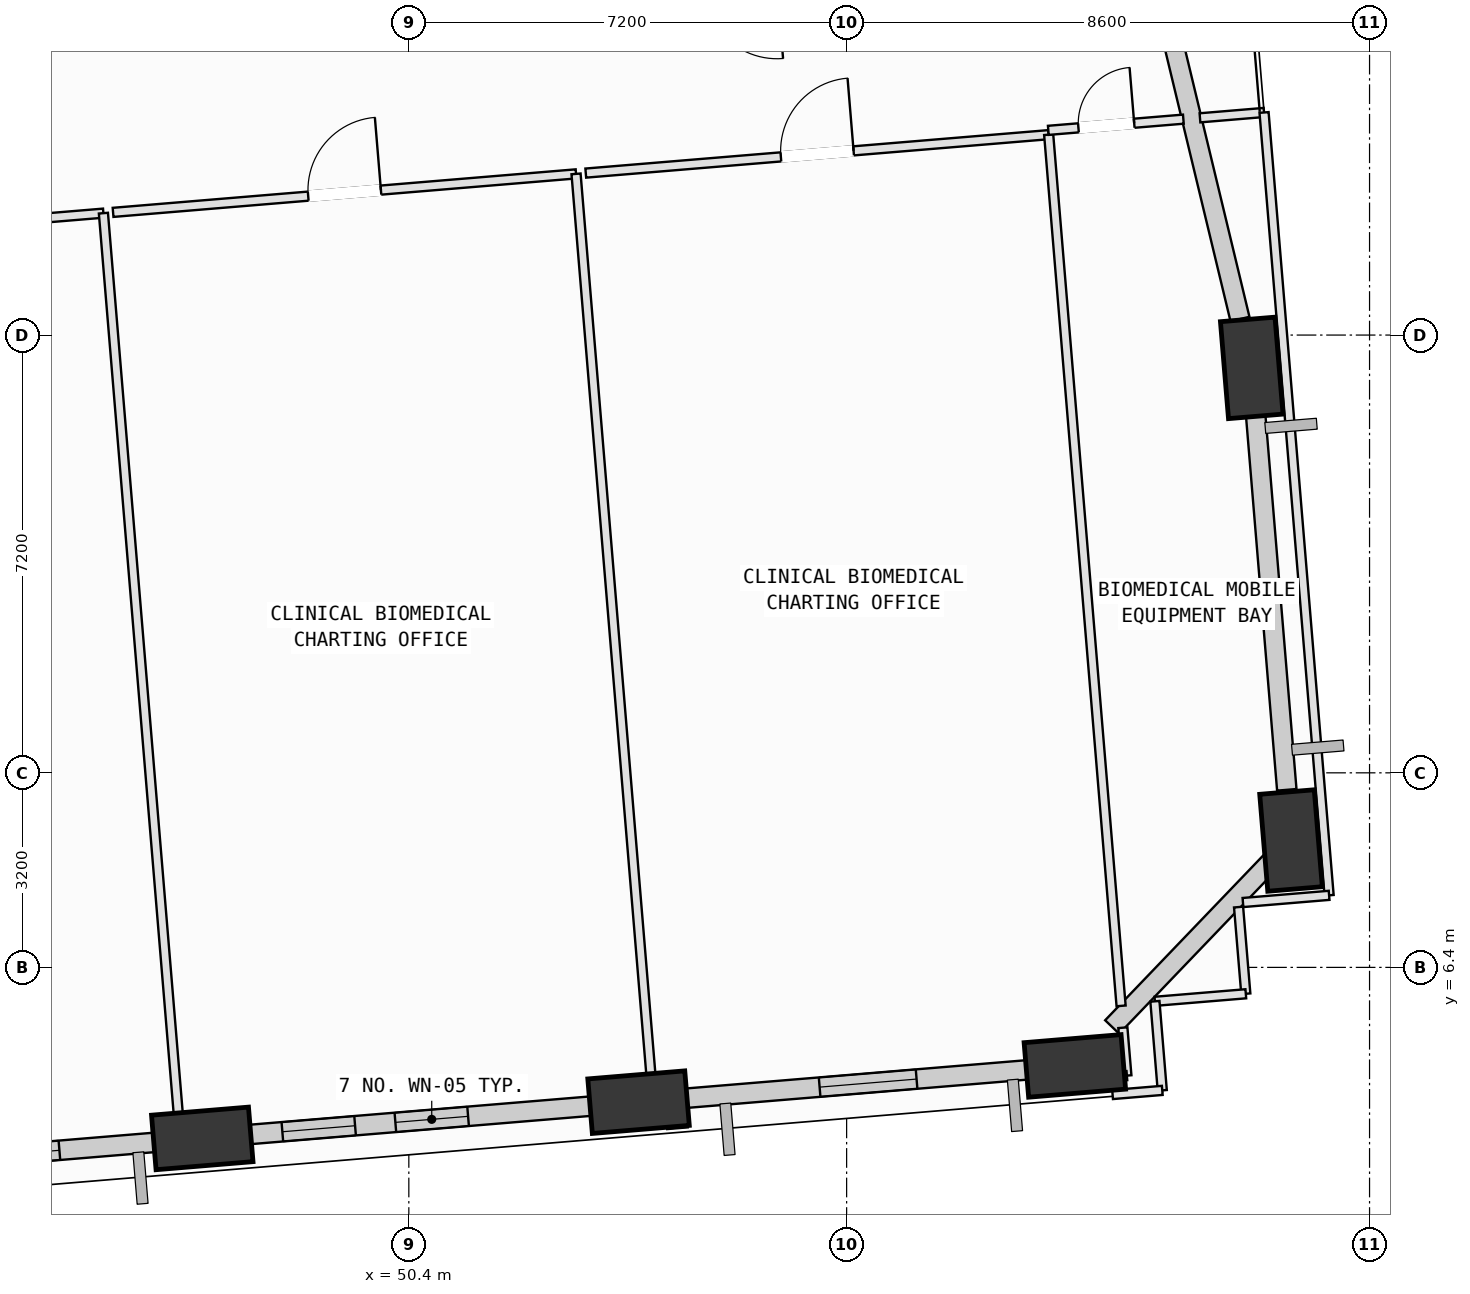
"""IFC4 building model, lengths in metres.
Left out: names, types, materials, properties, quantities, classifications, styles, units other than length and angle.
Written with IfcOpenShell. Run it as: python <this file> out.ifc"""

import sys

from ifc_helpers import new_model, si_unit, direction, frame, frame_2d, origin, origin_2d, place, context, subcontext, project, spatial, rectangle, extrude, element, fill, save


model = new_model("IFC4")
c1 = context("Model", 3, precision=1e-05, world=origin(), true_north=direction((0.0, 1.0)))
c2 = subcontext(c1, "Body", "Model", "MODEL_VIEW")
j1 = project(units=[si_unit("LENGTHUNIT", "METRE"), si_unit("PLANEANGLEUNIT", "RADIAN")], contexts=[c1])
p1 = place(None, origin())
s1 = spatial("IfcSite", under=j1, at=p1, CompositionType="ELEMENT")
p2 = place(p1, origin())
s2 = spatial("IfcBuilding", under=s1, at=p2, CompositionType="ELEMENT")
p3 = place(p2, frame((0.0, 0.0, 43.0)))
s3 = spatial("IfcBuildingStorey", under=s2, at=p3, CompositionType="ELEMENT", Elevation=43.0)
p4 = place(p3, frame((47.003, 3.587, 0.002), z_axis=(0.087007750901, 0.05595959398, 0.99463469431), x_axis=(-0.608351167105, 0.793621744244, 0.008566477999)))
e1 = element("IfcColumn", 1, at=p4, inside=s3, PredefinedType="COLUMN", context=c2, shape_type="SweptSolid", body=[
    extrude(rectangle(XDim=1.6, YDim=0.9, at=origin_2d()), origin(), (0.0, 0.0, 1.0), 4.018),
])
p5 = place(p3, frame((54.178, 4.183, 0.002), z_axis=(0.084177518117, 0.085390450655, 0.992785282113), x_axis=(-0.767415180353, 0.641073593575, 0.00992917841)))
e2 = element("IfcColumn", 2, at=p5, inside=s3, PredefinedType="COLUMN", context=c2, shape_type="SweptSolid", body=[
    extrude(rectangle(XDim=1.6, YDim=0.9, at=origin_2d()), origin(), (0.0, 0.0, 1.0), 4.026),
])
p6 = place(p3, frame((61.353, 4.78, 0.002), z_axis=(0.081226798474, 0.11461264565, 0.990083909912), x_axis=(-0.860485068136, 0.509342839907, 0.011632667372)))
e3 = element("IfcColumn", 3, at=p6, inside=s3, PredefinedType="COLUMN", context=c2, shape_type="SweptSolid", body=[
    extrude(rectangle(XDim=1.6, YDim=0.9, at=origin_2d()), origin(), (0.0, 0.0, 1.0), 4.037),
])
p7 = place(p3, frame((64.908, 8.487, 0.002), z_axis=(0.065883618788, 0.128926384289, 0.989463155559), x_axis=(-0.374965636524, -0.915741149451, 0.144287624654)))
e4 = element("IfcColumn", 4, at=p7, inside=s3, PredefinedType="COLUMN", context=c2, shape_type="SweptSolid", body=[
    extrude(rectangle(XDim=1.6, YDim=0.9, at=origin_2d()), origin(), (0.0, 0.0, 1.0), 4.039),
])
p8 = place(p3, frame((64.262, 16.26, 0.002), z_axis=(0.034096730503, 0.126272971756, 0.991409375371), x_axis=(-0.17761535471, -0.975429466717, 0.130346235969)))
e5 = element("IfcColumn", 5, at=p8, inside=s3, PredefinedType="COLUMN", context=c2, shape_type="SweptSolid", body=[
    extrude(rectangle(XDim=1.6, YDim=0.9, at=origin_2d()), origin(), (0.0, 0.0, 1.0), 4.031),
])
p9 = place(p3, frame((46.588, 3.552, 0.0), z_axis=(0.0, 0.0, 1.0), x_axis=(-0.99656613328, -0.082800615939, 0.0)))
e6 = element("IfcWall", 6, at=p9, inside=s3, PredefinedType="SOLIDWALL", context=c2, shape_type="SweptSolid", body=[
    extrude(rectangle(XDim=5.529, YDim=0.32, at=frame_2d((2.764, 0.0))), origin(), (0.0, 0.0, 1.0), 3.145),
])
p10 = place(p9, frame((1.941, 0.0, 0.75)))
e7 = element("IfcOpeningElement", 7, at=p10, cuts=e6, PredefinedType="OPENING", context=c2, shape_type="SweptSolid", body=[
    extrude(rectangle(XDim=1.8, YDim=2.05, at=frame_2d((0.9, 1.025))), frame((0.0, 0.17, 0.0), z_axis=(0.0, -1.0, 0.0), x_axis=(1.0, 0.0, 0.0)), (0.0, 0.0, 1.0), 0.34),
])
p11 = place(p3, frame((53.775, 4.15, 0.0), z_axis=(0.0, 0.0, 1.0), x_axis=(-0.996563099215, -0.082837125026, 0.0)))
e8 = element("IfcWall", 8, at=p11, inside=s3, PredefinedType="SOLIDWALL", context=c2, shape_type="SweptSolid", body=[
    extrude(rectangle(XDim=6.012, YDim=0.32, at=frame_2d((3.006, 0.0))), origin(), (0.0, 0.0, 1.0), 2.865),
])
p12 = place(p11, frame((2.409, 0.0, 0.75)))
e9 = element("IfcOpeningElement", 9, at=p12, cuts=e8, PredefinedType="OPENING", context=c2, shape_type="SweptSolid", body=[
    extrude(rectangle(XDim=1.2, YDim=1.75, at=frame_2d((0.6, 0.875))), frame((0.0, 0.17, 0.0), z_axis=(0.0, -1.0, 0.0), x_axis=(1.0, 0.0, 0.0)), (0.0, 0.0, 1.0), 0.34),
])
p13 = place(p11, frame((4.274, 0.0, 0.75)))
e10 = element("IfcOpeningElement", 10, at=p13, cuts=e8, PredefinedType="OPENING", context=c2, shape_type="SweptSolid", body=[
    extrude(rectangle(XDim=1.2, YDim=1.75, at=frame_2d((0.6, 0.875))), frame((0.0, 0.17, 0.0), z_axis=(0.0, -1.0, 0.0), x_axis=(1.0, 0.0, 0.0)), (0.0, 0.0, 1.0), 0.34),
])
p14 = place(p3, frame((60.969, 4.748, 0.0), z_axis=(0.0, 0.0, 1.0), x_axis=(-0.996566340034, -0.082798127465, 0.0)))
e11 = element("IfcWall", 11, at=p14, inside=s3, PredefinedType="SOLIDWALL", context=c2, shape_type="SweptSolid", body=[
    extrude(rectangle(XDim=6.045, YDim=0.32, at=frame_2d((3.022, 0.0))), origin(), (0.0, 0.0, 1.0), 2.865),
])
p15 = place(p14, frame((2.227, 0.0, 0.75)))
e12 = element("IfcOpeningElement", 12, at=p15, cuts=e11, PredefinedType="OPENING", context=c2, shape_type="SweptSolid", body=[
    extrude(rectangle(XDim=1.6, YDim=1.95, at=frame_2d((0.8, 0.975))), frame((0.0, 0.17, 0.0), z_axis=(0.0, -1.0, 0.0), x_axis=(1.0, 0.0, 0.0)), (0.0, 0.0, 1.0), 0.34),
])
p16 = place(p3, frame((64.686, 8.254, 0.0), z_axis=(0.0, 0.0, 1.0), x_axis=(-0.692157788421, -0.721746212964, 0.0)))
e13 = element("IfcWall", 13, at=p16, inside=s3, PredefinedType="SOLIDWALL", context=c2, shape_type="SweptSolid", body=[
    extrude(rectangle(XDim=3.927, YDim=0.32, at=frame_2d((1.964, 0.0))), origin(), (0.0, 0.0, 1.0), 3.165),
])
p17 = place(p3, frame((64.292, 15.908, 0.0), z_axis=(0.0, 0.0, 1.0), x_axis=(0.082804011352, -0.996565851163, 0.0)))
e14 = element("IfcWall", 14, at=p17, inside=s3, PredefinedType="SOLIDWALL", context=c2, shape_type="SweptSolid", body=[
    extrude(rectangle(XDim=6.61, YDim=0.32, at=frame_2d((3.305, 0.0))), origin(), (0.0, 0.0, 1.0), 3.165),
])
p18 = place(p3, frame((62.052, 25.438, 0.0), z_axis=(0.0, 0.0, 1.0), x_axis=(0.234137183884, -0.972203568767, 0.0)))
e15 = element("IfcWall", 15, at=p18, inside=s3, PredefinedType="SOLIDWALL", context=c2, shape_type="SweptSolid", body=[
    extrude(rectangle(XDim=8.614, YDim=0.32, at=frame_2d((4.307, 0.0))), origin(), (0.0, 0.0, 1.0), 3.165),
])
p19 = place(p3, frame((38.03, 18.194, 0.0), z_axis=(0.0, 0.0, 1.0), x_axis=(0.996561498978, 0.082856374255, 0.0)))
e16 = element("IfcWall", 16, at=p19, inside=s3, PredefinedType="PARTITIONING", context=c2, shape_type="SweptSolid", body=[
    extrude(rectangle(XDim=7.372, YDim=0.15, at=frame_2d((3.686, 0.0))), origin(), (0.0, 0.0, 1.0), 3.78),
])
p20 = place(p19, frame((3.086, 0.0, 0.0)))
e17 = element("IfcOpeningElement", 17, at=p20, cuts=e16, PredefinedType="OPENING", context=c2, shape_type="SweptSolid", body=[
    extrude(rectangle(XDim=1.2, YDim=2.15, at=frame_2d((0.6, 1.075))), frame((0.0, 0.085, 0.0), z_axis=(0.0, -1.0, 0.0), x_axis=(1.0, 0.0, 0.0)), (0.0, 0.0, 1.0), 0.17),
])
p21 = place(p3, frame((45.377, 18.805, 0.0), z_axis=(0.0, 0.0, 1.0), x_axis=(0.082821840324, -0.996564369605, 0.0)))
e18 = element("IfcWall", 18, at=p21, inside=s3, PredefinedType="PARTITIONING", context=c2, shape_type="SweptSolid", body=[
    extrude(rectangle(XDim=15.178, YDim=0.15, at=frame_2d((7.589, 0.0))), origin(), (0.0, 0.0, 1.0), 3.78),
])
p22 = place(p3, frame((45.536, 18.818, 0.0), z_axis=(0.0, 0.0, 1.0), x_axis=(0.996564025251, 0.082825983694, 0.0)))
e19 = element("IfcWall", 19, at=p22, inside=s3, PredefinedType="PARTITIONING", context=c2, shape_type="SweptSolid", body=[
    extrude(rectangle(XDim=7.64, YDim=0.15, at=frame_2d((3.82, 0.0))), origin(), (0.0, 0.0, 1.0), 3.78),
])
p23 = place(p22, frame((3.22, 0.0, 0.0)))
e20 = element("IfcOpeningElement", 20, at=p23, cuts=e19, PredefinedType="OPENING", context=c2, shape_type="SweptSolid", body=[
    extrude(rectangle(XDim=1.2, YDim=2.15, at=frame_2d((0.6, 1.075))), frame((0.0, 0.085, 0.0), z_axis=(0.0, -1.0, 0.0), x_axis=(1.0, 0.0, 0.0)), (0.0, 0.0, 1.0), 0.17),
])
p24 = place(p3, frame((53.15, 19.451, 0.0), z_axis=(0.0, 0.0, 1.0), x_axis=(0.08281520051, -0.9965649214, 0.0)))
e21 = element("IfcWall", 21, at=p24, inside=s3, PredefinedType="PARTITIONING", context=c2, shape_type="SweptSolid", body=[
    extrude(rectangle(XDim=15.53, YDim=0.15, at=frame_2d((7.765, 0.0))), origin(), (0.0, 0.0, 1.0), 3.78),
])
p25 = place(p3, frame((54.436, 3.974, 0.0), z_axis=(0.0, 0.0, 1.0), x_axis=(-0.996582247746, -0.082606437266, 0.0)))
e22 = element("IfcWall", 22, at=p25, inside=s3, PredefinedType="PARTITIONING", context=c2, shape_type="SweptSolid", body=[
    extrude(rectangle(XDim=0.644, YDim=0.15, at=frame_2d((0.322, 0.0))), origin(), (0.0, 0.0, 1.0), 3.78),
])
p26 = place(p3, frame((47.803, 3.423, 0.0), z_axis=(0.0, 0.0, 1.0), x_axis=(-0.9965217706, -0.083332830991, 0.0)))
e23 = element("IfcWall", 23, at=p26, inside=s3, PredefinedType="PARTITIONING", context=c2, shape_type="SweptSolid", body=[
    extrude(rectangle(XDim=0.984, YDim=0.15, at=frame_2d((0.492, 0.0))), origin(), (0.0, 0.0, 1.0), 3.145),
])
p27 = place(p3, frame((53.31, 19.464, 0.0), z_axis=(0.0, 0.0, 1.0), x_axis=(0.996573693204, 0.082709576308, 0.0)))
e24 = element("IfcWall", 24, at=p27, inside=s3, PredefinedType="PARTITIONING", context=c2, shape_type="SweptSolid", body=[
    extrude(rectangle(XDim=7.639, YDim=0.15, at=frame_2d((3.82, 0.0))), origin(), (0.0, 0.0, 1.0), 3.78),
])
p28 = place(p27, frame((3.219, 0.0, 0.0)))
e25 = element("IfcOpeningElement", 25, at=p28, cuts=e24, PredefinedType="OPENING", context=c2, shape_type="SweptSolid", body=[
    extrude(rectangle(XDim=1.2, YDim=2.15, at=frame_2d((0.6, 1.075))), frame((0.0, 0.085, 0.0), z_axis=(0.0, -1.0, 0.0), x_axis=(1.0, 0.0, 0.0)), (0.0, 0.0, 1.0), 0.17),
])
p29 = place(p3, frame((60.923, 20.096, 0.0), z_axis=(0.0, 0.0, 1.0), x_axis=(0.082827667488, -0.996563885307, 0.0)))
e26 = element("IfcWall", 26, at=p29, inside=s3, PredefinedType="PARTITIONING", context=c2, shape_type="SweptSolid", body=[
    extrude(rectangle(XDim=14.378, YDim=0.15, at=frame_2d((7.189, 0.0))), origin(), (0.0, 0.0, 1.0), 3.78),
])
p30 = place(p3, frame((62.143, 5.408, 0.0), z_axis=(0.0, 0.0, 1.0), x_axis=(0.083377708252, -0.99651801678, 0.0)))
e27 = element("IfcWall", 27, at=p30, inside=s3, PredefinedType="PARTITIONING", context=c2, shape_type="SweptSolid", body=[
    extrude(rectangle(XDim=0.791, YDim=0.15, at=frame_2d((0.395, 0.0))), origin(), (0.0, 0.0, 1.0), 3.78),
])
p31 = place(p3, frame((62.209, 4.62, 0.0), z_axis=(0.0, 0.0, 1.0), x_axis=(-0.996590962636, -0.08250123146, 0.0)))
e28 = element("IfcWall", 28, at=p31, inside=s3, PredefinedType="PARTITIONING", context=c2, shape_type="SweptSolid", body=[
    extrude(rectangle(XDim=1.225, YDim=0.15, at=frame_2d((0.613, 0.0))), origin(), (0.0, 0.0, 1.0), 3.78),
])
p32 = place(p3, frame((49.107, 21.934, 0.0), z_axis=(0.0, 0.0, 1.0), x_axis=(-0.996568963574, -0.082766544215, 0.0)))
e29 = element("IfcWall", 29, at=p32, inside=s3, PredefinedType="PARTITIONING", context=c2, shape_type="SweptSolid", body=[
    extrude(rectangle(XDim=14.705, YDim=0.15, at=frame_2d((7.352, 0.0))), origin(), (0.0, 0.0, 1.0), 3.78),
])
p33 = place(p32, frame((6.752, 0.0, 0.0)))
e30 = element("IfcOpeningElement", 30, at=p33, cuts=e29, PredefinedType="OPENING", context=c2, shape_type="SweptSolid", body=[
    extrude(rectangle(XDim=1.2, YDim=2.15, at=frame_2d((0.6, 1.075))), frame((0.0, 0.085, 0.0), z_axis=(0.0, -1.0, 0.0), x_axis=(1.0, 0.0, 0.0)), (0.0, 0.0, 1.0), 0.17),
])
p34 = place(p3, frame((64.046, 7.392, 0.0), z_axis=(0.0, 0.0, 1.0), x_axis=(0.083257268656, -0.996528086516, 0.0)))
e31 = element("IfcWall", 31, at=p34, inside=s3, PredefinedType="PARTITIONING", context=c2, shape_type="SweptSolid", body=[
    extrude(rectangle(XDim=1.431, YDim=0.15, at=frame_2d((0.715, 0.0))), origin(), (0.0, 0.0, 1.0), 3.78),
])
p35 = place(p3, frame((64.165, 5.966, 0.0), z_axis=(0.0, 0.0, 1.0), x_axis=(-0.99657711121, -0.082668382184, 0.0)))
e32 = element("IfcWall", 32, at=p35, inside=s3, PredefinedType="PARTITIONING", context=c2, shape_type="SweptSolid", body=[
    extrude(rectangle(XDim=1.5, YDim=0.15, at=frame_2d((0.75, 0.0))), origin(), (0.0, 0.0, 1.0), 3.78),
])
p36 = place(p3, frame((62.67, 5.842, 0.0), z_axis=(0.0, 0.0, 1.0), x_axis=(0.082372007879, -0.996601651774, 0.0)))
e33 = element("IfcWall", 33, at=p36, inside=s3, PredefinedType="PARTITIONING", context=c2, shape_type="SweptSolid", body=[
    extrude(rectangle(XDim=1.47, YDim=0.15, at=frame_2d((0.735, 0.0))), origin(), (0.0, 0.0, 1.0), 3.78),
])
p37 = place(p3, frame((62.791, 4.377, 0.0), z_axis=(0.0, 0.0, 1.0), x_axis=(-0.99656626832, -0.082798990614, 0.0)))
e34 = element("IfcWall", 34, at=p37, inside=s3, PredefinedType="PARTITIONING", context=c2, shape_type="SweptSolid", body=[
    extrude(rectangle(XDim=0.82, YDim=0.15, at=frame_2d((0.41, 0.0))), origin(), (0.0, 0.0, 1.0), 3.78),
])
p38 = place(p3, frame((60.917, 20.167, 0.0), z_axis=(0.0, 0.0, 1.0), x_axis=(0.996582679805, 0.082601224643, 0.0)))
e35 = element("IfcWall", 35, at=p38, inside=s3, PredefinedType="PARTITIONING", context=c2, shape_type="SweptSolid", body=[
    extrude(rectangle(XDim=2.229, YDim=0.15, at=frame_2d((1.114, 0.0))), origin(), (0.0, 0.0, 1.0), 3.78),
])
p39 = place(p38, frame((0.497, 0.0, 0.0)))
e36 = element("IfcOpeningElement", 36, at=p39, cuts=e35, PredefinedType="OPENING", context=c2, shape_type="SweptSolid", body=[
    extrude(rectangle(XDim=0.92, YDim=2.1, at=frame_2d((0.46, 1.05))), frame((0.0, 0.085, 0.0), z_axis=(0.0, -1.0, 0.0), x_axis=(1.0, 0.0, 0.0)), (0.0, 0.0, 1.0), 0.17),
])
p40 = place(p3, frame((63.411, 20.373, 0.0), z_axis=(0.0, 0.0, 1.0), x_axis=(0.99654257423, 0.083083679185, 0.0)))
e37 = element("IfcWall", 37, at=p40, inside=s3, PredefinedType="PARTITIONING", context=c2, shape_type="SweptSolid", body=[
    extrude(rectangle(XDim=1.058, YDim=0.15, at=frame_2d((0.529, 0.0))), origin(), (0.0, 0.0, 1.0), 3.78),
])
p41 = place(p3, frame((64.465, 20.461, 0.0), z_axis=(0.0, 0.0, 1.0), x_axis=(0.082801525688, -0.996566057692, 0.0)))
e38 = element("IfcWall", 38, at=p41, inside=s3, PredefinedType="PARTITIONING", context=c2, shape_type="SweptSolid", body=[
    extrude(rectangle(XDim=12.92, YDim=0.15, at=frame_2d((6.46, 0.0))), origin(), (0.0, 0.0, 1.0), 3.165),
])
p42 = place(p3, frame((65.535, 7.585, 0.0), z_axis=(0.0, 0.0, 1.0), x_axis=(-0.996555224945, -0.082931801111, 0.0)))
e39 = element("IfcWall", 39, at=p42, inside=s3, PredefinedType="PARTITIONING", context=c2, shape_type="SweptSolid", body=[
    extrude(rectangle(XDim=1.422, YDim=0.15, at=frame_2d((0.711, 0.0))), origin(), (0.0, 0.0, 1.0), 3.78),
])
p43 = place(p10, origin())
e40 = element("IfcWindow", 40, at=p43, inside=s3, PartitioningType="SINGLE_PANEL", PredefinedType="WINDOW", context=c2, shape_type="SweptSolid", body=[
    extrude(rectangle(XDim=1.8, YDim=2.05, at=frame_2d((0.9, 1.025))), frame((0.0, 0.03, 0.0), z_axis=(0.0, -1.0, 0.0), x_axis=(1.0, 0.0, 0.0)), (0.0, 0.0, 1.0), 0.06),
])
fill(e7, e40)
p44 = place(p12, origin())
e41 = element("IfcWindow", 41, at=p44, inside=s3, PartitioningType="SINGLE_PANEL", PredefinedType="WINDOW", context=c2, shape_type="SweptSolid", body=[
    extrude(rectangle(XDim=1.2, YDim=1.75, at=frame_2d((0.6, 0.875))), frame((0.0, 0.03, 0.0), z_axis=(0.0, -1.0, 0.0), x_axis=(1.0, 0.0, 0.0)), (0.0, 0.0, 1.0), 0.06),
])
fill(e9, e41)
p45 = place(p13, origin())
e42 = element("IfcWindow", 42, at=p45, inside=s3, PartitioningType="SINGLE_PANEL", PredefinedType="WINDOW", context=c2, shape_type="SweptSolid", body=[
    extrude(rectangle(XDim=1.2, YDim=1.75, at=frame_2d((0.6, 0.875))), frame((0.0, 0.03, 0.0), z_axis=(0.0, -1.0, 0.0), x_axis=(1.0, 0.0, 0.0)), (0.0, 0.0, 1.0), 0.06),
])
fill(e10, e42)
p46 = place(p15, origin())
e43 = element("IfcWindow", 43, at=p46, inside=s3, PartitioningType="SINGLE_PANEL", PredefinedType="WINDOW", context=c2, shape_type="SweptSolid", body=[
    extrude(rectangle(XDim=1.6, YDim=1.95, at=frame_2d((0.8, 0.975))), frame((0.0, 0.03, 0.0), z_axis=(0.0, -1.0, 0.0), x_axis=(1.0, 0.0, 0.0)), (0.0, 0.0, 1.0), 0.06),
])
fill(e12, e43)
p47 = place(p23, origin())
e44 = element("IfcDoor", 44, at=p47, inside=s3, OperationType="SINGLE_SWING_RIGHT", PredefinedType="DOOR", context=c2, shape_type="SweptSolid", body=[
    extrude(rectangle(XDim=1.2, YDim=2.15, at=frame_2d((0.6, 1.075))), frame((0.0, 0.025, 0.0), z_axis=(0.0, -1.0, 0.0), x_axis=(1.0, 0.0, 0.0)), (0.0, 0.0, 1.0), 0.05),
])
fill(e20, e44)
p48 = place(p28, origin())
e45 = element("IfcDoor", 45, at=p48, inside=s3, OperationType="SINGLE_SWING_RIGHT", PredefinedType="DOOR", context=c2, shape_type="SweptSolid", body=[
    extrude(rectangle(XDim=1.2, YDim=2.15, at=frame_2d((0.6, 1.075))), frame((0.0, 0.025, 0.0), z_axis=(0.0, -1.0, 0.0), x_axis=(1.0, 0.0, 0.0)), (0.0, 0.0, 1.0), 0.05),
])
fill(e25, e45)
p49 = place(p39, origin())
e46 = element("IfcDoor", 46, at=p49, inside=s3, OperationType="SINGLE_SWING_RIGHT", PredefinedType="DOOR", context=c2, shape_type="SweptSolid", body=[
    extrude(rectangle(XDim=0.92, YDim=2.1, at=frame_2d((0.46, 1.05))), frame((0.0, 0.025, 0.0), z_axis=(0.0, -1.0, 0.0), x_axis=(1.0, 0.0, 0.0)), (0.0, 0.0, 1.0), 0.05),
])
fill(e36, e46)
save(model, sys.argv[1])
